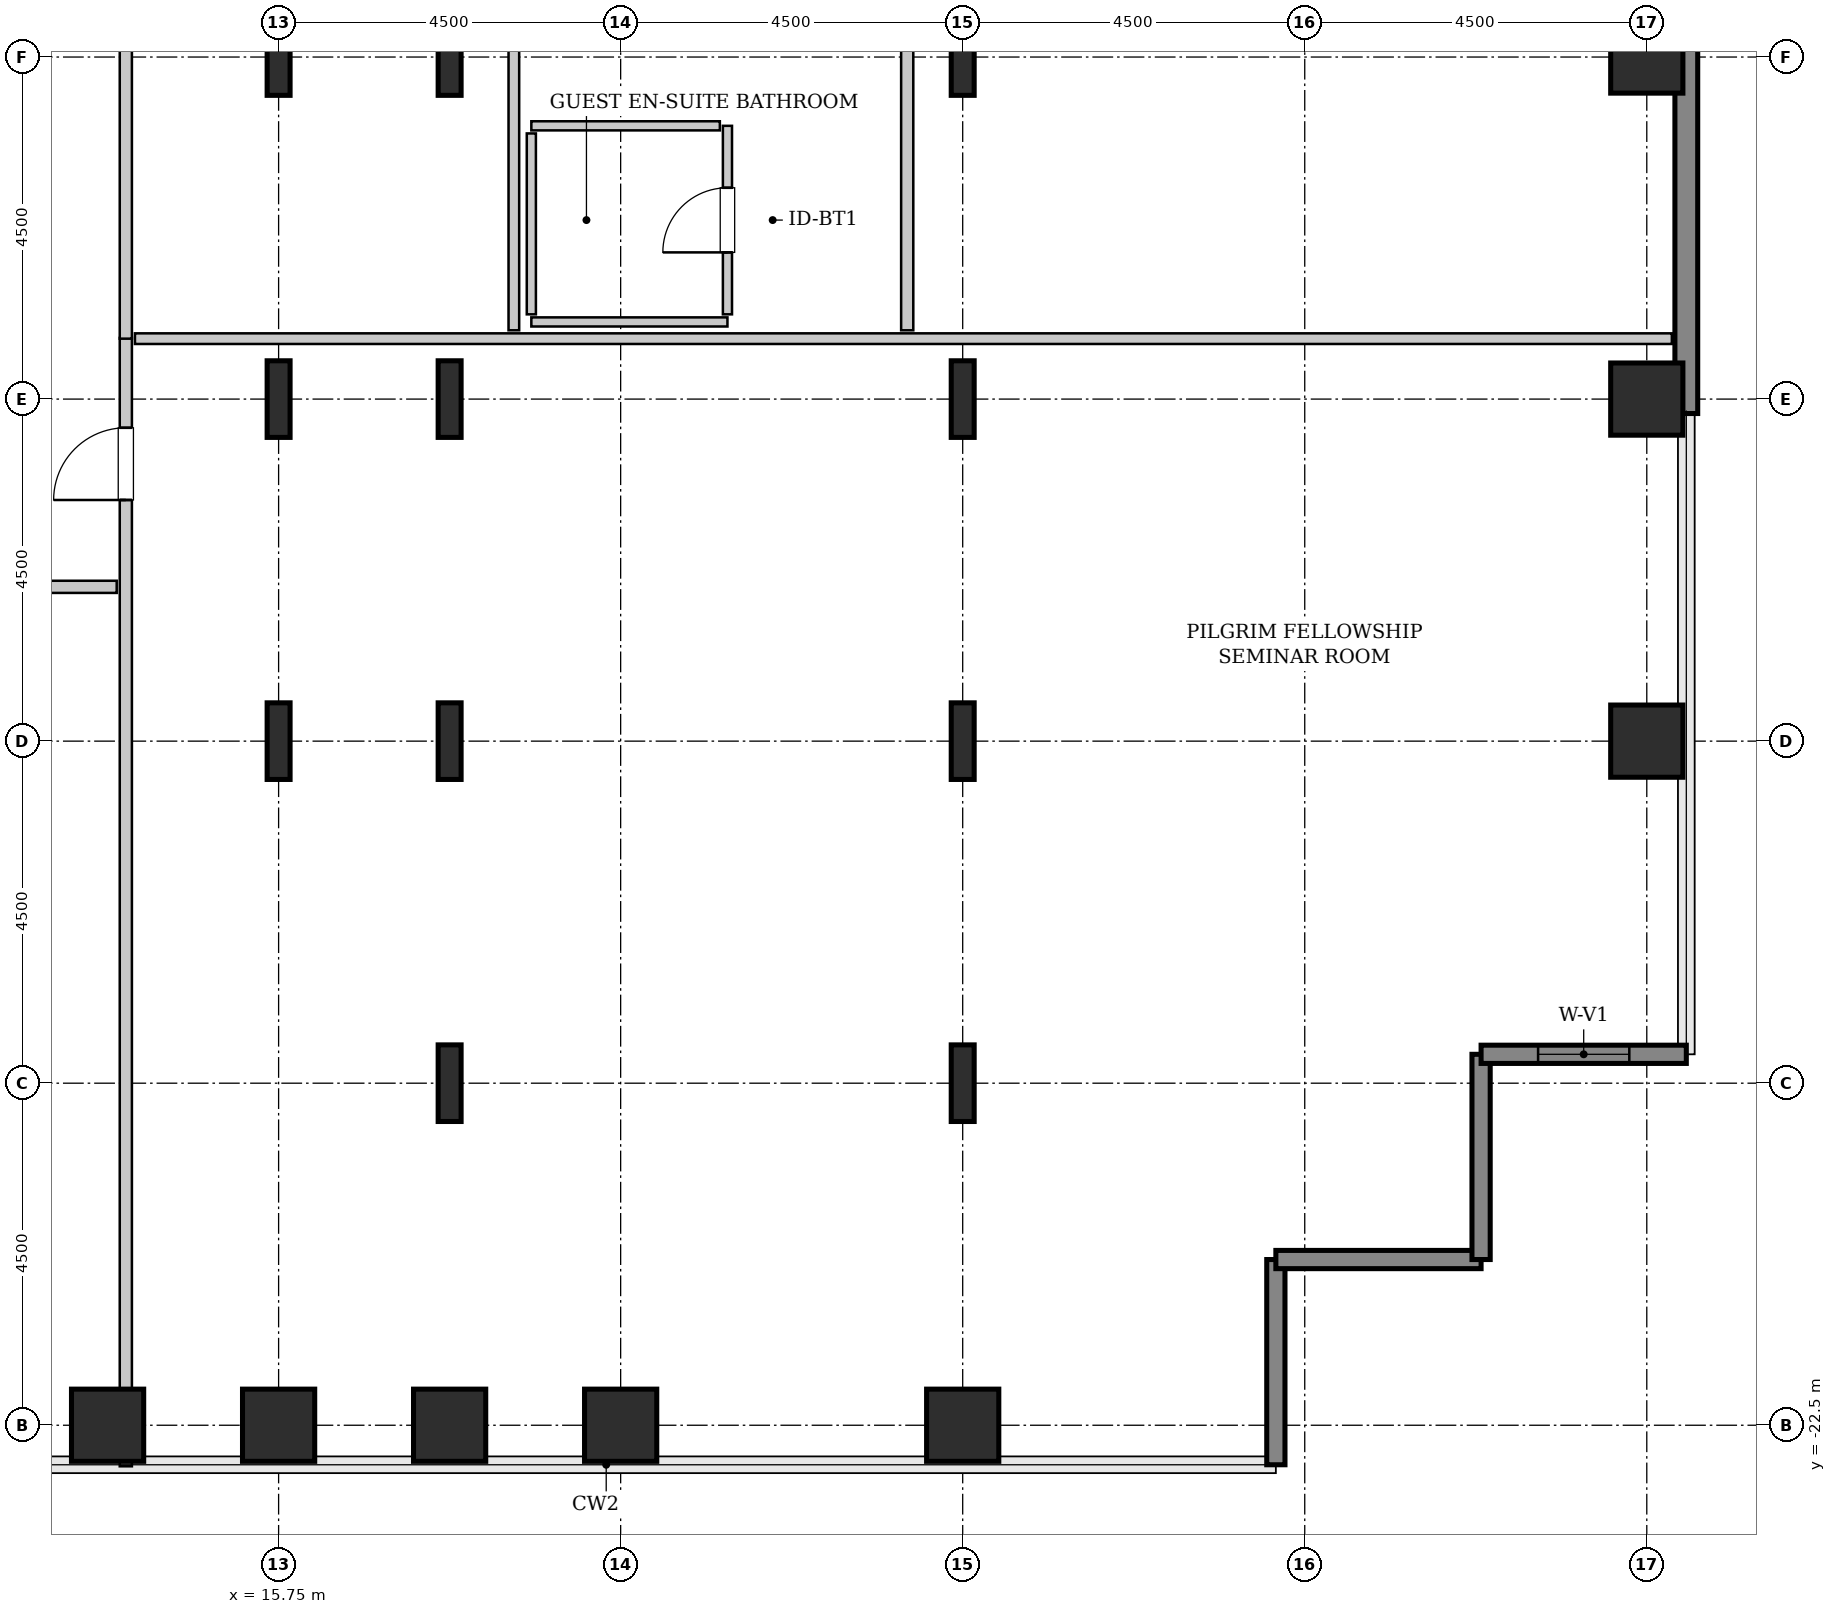
"""IFC4 building model, lengths in metres.
Left out: names, types, materials, properties, quantities, classifications, styles, units other than length and angle.
Written with IfcOpenShell. Run it as: python <this file> out.ifc"""

import sys

from ifc_helpers import new_model, si_unit, direction, frame, frame_2d, origin, origin_2d, place, context, subcontext, project, spatial, rectangle, hollow_rectangle, i_section, extrude, source, transform, mapped, element, fill, save


model = new_model("IFC4")
c1 = context("Model", 3, precision=1e-05, world=origin(), true_north=direction((0.0, 1.0)))
c2 = subcontext(c1, "Body", "Model", "MODEL_VIEW")
j1 = project(units=[si_unit("LENGTHUNIT", "METRE"), si_unit("PLANEANGLEUNIT", "RADIAN")], contexts=[c1])
p1 = place(None, origin())
s1 = spatial("IfcSite", under=j1, at=p1, CompositionType="ELEMENT")
p2 = place(p1, origin())
s2 = spatial("IfcBuilding", under=s1, at=p2, CompositionType="ELEMENT")
p3 = place(p2, frame((0.0, 0.0, 78.6)))
s3 = spatial("IfcBuildingStorey", under=s2, at=p3, CompositionType="ELEMENT", Elevation=78.6)
m1 = source(origin(), c2, "Body", "SweptSolid", [
    extrude(hollow_rectangle(XDim=0.95, YDim=0.95, WallThickness=0.045, InnerFilletRadius=0.045, OuterFilletRadius=0.09, at=origin_2d()), origin(), (0.0, 0.0, 1.0), 3.8),
])
for number, where, z_axis, x_axis in (
    (1, (13.5, -22.5, 0.0), (0.0, 0.0, 1.0), (1.0, 0.0, 0.0)),
    (2, (15.75, -22.5, 0.0), (0.0, 0.0, 1.0), (1.0, 0.0, 0.0)),
):
    element("IfcColumn", number, at=place(p3, frame(where, z_axis=z_axis, x_axis=x_axis)), inside=s3, PredefinedType="COLUMN", context=c2, shape_type="MappedRepresentation", body=[
        mapped(m1, transform((0.0, 0.0, 0.0), x_axis=(1.0, 0.0, 0.0), y_axis=(0.0, 1.0, 0.0), z_axis=(0.0, 0.0, 1.0), scale=1.0)),
    ])
m2 = source(origin(), c2, "Body", "SweptSolid", [
    extrude(i_section(OverallWidth=0.302, OverallDepth=1.008, WebThickness=0.021, FlangeThickness=0.04, FilletRadius=0.03, at=origin_2d()), origin(), (0.0, 0.0, 1.0), 3.8),
])
for number, where, z_axis, x_axis in (
    (3, (15.75, -13.5, 0.0), (0.0, 0.0, 1.0), (1.0, 0.0, 0.0)),
    (4, (15.75, -9.0, 0.0), (0.0, 0.0, 1.0), (1.0, 0.0, 0.0)),
    (5, (15.75, -4.5, 0.0), (0.0, 0.0, 1.0), (1.0, 0.0, 0.0)),
):
    element("IfcColumn", number, at=place(p3, frame(where, z_axis=z_axis, x_axis=x_axis)), inside=s3, PredefinedType="COLUMN", context=c2, shape_type="MappedRepresentation", body=[
        mapped(m2, transform((0.0, 0.0, 0.0), x_axis=(1.0, 0.0, 0.0), y_axis=(0.0, 1.0, 0.0), z_axis=(0.0, 0.0, 1.0), scale=1.0)),
    ])
p4 = place(p3, frame((18.0, -22.5, 0.0), z_axis=(0.0, 0.0, 1.0), x_axis=(1.0, 0.0, 0.0)))
e6 = element("IfcColumn", 6, at=p4, inside=s3, PredefinedType="COLUMN", context=c2, shape_type="MappedRepresentation", body=[
    mapped(m1, transform((0.0, 0.0, 0.0), x_axis=(1.0, 0.0, 0.0), y_axis=(0.0, 1.0, 0.0), z_axis=(0.0, 0.0, 1.0), scale=1.0)),
])
for number, where, z_axis, x_axis in (
    (7, (18.0, -18.0, 0.0), (0.0, 0.0, 1.0), (1.0, 0.0, 0.0)),
    (8, (18.0, -13.5, 0.0), (0.0, 0.0, 1.0), (1.0, 0.0, 0.0)),
    (9, (18.0, -9.0, 0.0), (0.0, 0.0, 1.0), (1.0, 0.0, 0.0)),
    (10, (18.0, -4.5, 0.0), (0.0, 0.0, 1.0), (1.0, 0.0, 0.0)),
):
    element("IfcColumn", number, at=place(p3, frame(where, z_axis=z_axis, x_axis=x_axis)), inside=s3, PredefinedType="COLUMN", context=c2, shape_type="MappedRepresentation", body=[
        mapped(m2, transform((0.0, 0.0, 0.0), x_axis=(1.0, 0.0, 0.0), y_axis=(0.0, 1.0, 0.0), z_axis=(0.0, 0.0, 1.0), scale=1.0)),
    ])
for number, where, z_axis, x_axis in (
    (11, (20.25, -22.5, 0.0), (0.0, 0.0, 1.0), (1.0, 0.0, 0.0)),
    (12, (24.75, -22.5, 0.0), (0.0, 0.0, 1.0), (1.0, 0.0, 0.0)),
):
    element("IfcColumn", number, at=place(p3, frame(where, z_axis=z_axis, x_axis=x_axis)), inside=s3, PredefinedType="COLUMN", context=c2, shape_type="MappedRepresentation", body=[
        mapped(m1, transform((0.0, 0.0, 0.0), x_axis=(1.0, 0.0, 0.0), y_axis=(0.0, 1.0, 0.0), z_axis=(0.0, 0.0, 1.0), scale=1.0)),
    ])
for number, where, z_axis, x_axis in (
    (13, (24.75, -18.0, 0.0), (0.0, 0.0, 1.0), (1.0, 0.0, 0.0)),
    (14, (24.75, -13.5, 0.0), (0.0, 0.0, 1.0), (1.0, 0.0, 0.0)),
    (15, (24.75, -9.0, 0.0), (0.0, 0.0, 1.0), (1.0, 0.0, 0.0)),
    (16, (24.75, -4.5, 0.0), (0.0, 0.0, 1.0), (1.0, 0.0, 0.0)),
):
    element("IfcColumn", number, at=place(p3, frame(where, z_axis=z_axis, x_axis=x_axis)), inside=s3, PredefinedType="COLUMN", context=c2, shape_type="MappedRepresentation", body=[
        mapped(m2, transform((0.0, 0.0, 0.0), x_axis=(1.0, 0.0, 0.0), y_axis=(0.0, 1.0, 0.0), z_axis=(0.0, 0.0, 1.0), scale=1.0)),
    ])
for number, where, z_axis, x_axis in (
    (17, (33.75, -13.5, 0.0), (0.0, 0.0, 1.0), (1.0, 0.0, 0.0)),
    (18, (33.75, -9.0, 0.0), (0.0, 0.0, 1.0), (1.0, 0.0, 0.0)),
    (19, (33.75, -4.5, 0.0), (0.0, 0.0, 1.0), (1.0, 0.0, 0.0)),
):
    element("IfcColumn", number, at=place(p3, frame(where, z_axis=z_axis, x_axis=x_axis)), inside=s3, PredefinedType="COLUMN", context=c2, shape_type="MappedRepresentation", body=[
        mapped(m1, transform((0.0, 0.0, 0.0), x_axis=(1.0, 0.0, 0.0), y_axis=(0.0, 1.0, 0.0), z_axis=(0.0, 0.0, 1.0), scale=1.0)),
    ])
m3 = source(origin(), c2, "Body", "SweptSolid", [
    extrude(rectangle(XDim=4.88, YDim=0.3, at=frame_2d((2.44, 0.0))), origin(), (0.0, 0.0, 1.0), 3.55),
])
p5 = place(p3, frame((34.27, -9.19, 0.0), z_axis=(0.0, 0.0, 1.0), x_axis=(0.0, 1.0, 0.0)))
e20 = element("IfcWall", 20, at=p5, inside=s3, PredefinedType="SHEAR", context=c2, shape_type="MappedRepresentation", body=[
    mapped(m3, transform((0.0, 0.0, 0.0), x_axis=(1.0, 0.0, 0.0), y_axis=(0.0, 1.0, 0.0), z_axis=(0.0, 0.0, 1.0), scale=1.0)),
])
m4 = source(origin(), c2, "Body", "SweptSolid", [
    extrude(rectangle(XDim=2.7, YDim=0.24, at=frame_2d((1.35, 0.0))), origin(), (0.0, 0.0, 1.0), 3.55),
])
for number, where, z_axis, x_axis in (
    (21, (28.87, -23.02, 0.0), (0.0, 0.0, 1.0), (0.0, 1.0, 0.0)),
    (22, (28.87, -20.32, 0.0), (0.0, 0.0, 1.0), (1.0, 0.0, 0.0)),
    (23, (31.57, -20.32, 0.0), (0.0, 0.0, 1.0), (0.0, 1.0, 0.0)),
):
    element("IfcWall", number, at=place(p3, frame(where, z_axis=z_axis, x_axis=x_axis)), inside=s3, PredefinedType="SHEAR", context=c2, shape_type="MappedRepresentation", body=[
        mapped(m4, transform((0.0, 0.0, 0.0), x_axis=(1.0, 0.0, 0.0), y_axis=(0.0, 1.0, 0.0), z_axis=(0.0, 0.0, 1.0), scale=1.0)),
    ])
p6 = place(p3, frame((31.57, -17.62, 0.0), z_axis=(0.0, 0.0, 1.0), x_axis=(1.0, 0.0, 0.0)))
e24 = element("IfcWall", 24, at=p6, inside=s3, PredefinedType="SHEAR", context=c2, shape_type="MappedRepresentation", body=[
    mapped(m4, transform((0.0, 0.0, 0.0), x_axis=(1.0, 0.0, 0.0), y_axis=(0.0, 1.0, 0.0), z_axis=(0.0, 0.0, 1.0), scale=1.0)),
])
p7 = place(p6, frame((0.75, 0.0, 0.85)))
e25 = element("IfcOpeningElement", 25, at=p7, cuts=e24, PredefinedType="OPENING", context=c2, shape_type="SweptSolid", body=[
    extrude(rectangle(XDim=1.2, YDim=1.8, at=frame_2d((0.6, 0.9))), frame((0.0, 0.13, 0.0), z_axis=(0.0, -1.0, 0.0), x_axis=(1.0, 0.0, 0.0)), (0.0, 0.0, 1.0), 0.26),
])
m5 = source(origin(), c2, "Body", "SweptSolid", [
    extrude(rectangle(XDim=2.58, YDim=0.12, at=frame_2d((1.29, 0.0))), origin(), (0.0, 0.0, 1.0), 3.535),
])
p8 = place(p3, frame((19.075, -7.985, 0.0), z_axis=(0.0, 0.0, 1.0), x_axis=(1.0, 0.0, 0.0)))
e26 = element("IfcWall", 26, at=p8, inside=s3, PredefinedType="PLUMBINGWALL", context=c2, shape_type="MappedRepresentation", body=[
    mapped(m5, transform((0.0, 0.0, 0.0), x_axis=(1.0, 0.0, 0.0), y_axis=(0.0, 1.0, 0.0), z_axis=(0.0, 0.0, 1.0), scale=1.0)),
])
m6 = source(origin(), c2, "Body", "SweptSolid", [
    extrude(rectangle(XDim=2.48, YDim=0.12, at=frame_2d((1.24, 0.0))), origin(), (0.0, 0.0, 1.0), 3.535),
])
p9 = place(p3, frame((21.655, -7.885, 0.0), z_axis=(0.0, 0.0, 1.0), x_axis=(0.0, 1.0, 0.0)))
e27 = element("IfcWall", 27, at=p9, inside=s3, PredefinedType="PLUMBINGWALL", context=c2, shape_type="MappedRepresentation", body=[
    mapped(m6, transform((0.0, 0.0, 0.0), x_axis=(1.0, 0.0, 0.0), y_axis=(0.0, 1.0, 0.0), z_axis=(0.0, 0.0, 1.0), scale=1.0)),
])
p10 = place(p9, frame((0.815, 0.0, 0.0)))
e28 = element("IfcOpeningElement", 28, at=p10, cuts=e27, PredefinedType="OPENING", context=c2, shape_type="SweptSolid", body=[
    extrude(rectangle(XDim=0.85, YDim=2.1, at=frame_2d((0.425, 1.05))), frame((0.0, 0.07, 0.0), z_axis=(0.0, -1.0, 0.0), x_axis=(1.0, 0.0, 0.0)), (0.0, 0.0, 1.0), 0.14),
])
p11 = place(p3, frame((19.075, -5.405, 0.0), z_axis=(0.0, 0.0, 1.0), x_axis=(1.0, 0.0, 0.0)))
e29 = element("IfcWall", 29, at=p11, inside=s3, PredefinedType="PLUMBINGWALL", context=c2, shape_type="MappedRepresentation", body=[
    mapped(m6, transform((0.0, 0.0, 0.0), x_axis=(1.0, 0.0, 0.0), y_axis=(0.0, 1.0, 0.0), z_axis=(0.0, 0.0, 1.0), scale=1.0)),
])
m7 = source(origin(), c2, "Body", "SweptSolid", [
    extrude(rectangle(XDim=2.38, YDim=0.12, at=frame_2d((1.19, 0.0))), origin(), (0.0, 0.0, 1.0), 3.535),
])
p12 = place(p3, frame((19.075, -7.885, 0.0), z_axis=(0.0, 0.0, 1.0), x_axis=(0.0, 1.0, 0.0)))
e30 = element("IfcWall", 30, at=p12, inside=s3, PredefinedType="PLUMBINGWALL", context=c2, shape_type="MappedRepresentation", body=[
    mapped(m7, transform((0.0, 0.0, 0.0), x_axis=(1.0, 0.0, 0.0), y_axis=(0.0, 1.0, 0.0), z_axis=(0.0, 0.0, 1.0), scale=1.0)),
])
m8 = source(origin(), c2, "Body", "SweptSolid", [
    extrude(rectangle(XDim=14.845, YDim=0.16, at=frame_2d((7.422, 0.0))), origin(), (0.0, 0.0, 1.0), 3.535),
])
p13 = place(p3, frame((13.74, -23.04, 0.0), z_axis=(0.0, 0.0, 1.0), x_axis=(0.0, 1.0, 0.0)))
e31 = element("IfcWall", 31, at=p13, inside=s3, PredefinedType="PARTITIONING", context=c2, shape_type="MappedRepresentation", body=[
    mapped(m8, transform((0.0, 0.0, 0.0), x_axis=(1.0, 0.0, 0.0), y_axis=(0.0, 1.0, 0.0), z_axis=(0.0, 0.0, 1.0), scale=1.0)),
])
p14 = place(p13, frame((12.712, 0.0, 0.0)))
e32 = element("IfcOpeningElement", 32, at=p14, cuts=e31, PredefinedType="OPENING", context=c2, shape_type="SweptSolid", body=[
    extrude(rectangle(XDim=0.95, YDim=2.1, at=frame_2d((0.475, 1.05))), frame((0.0, 0.09, 0.0), z_axis=(0.0, -1.0, 0.0), x_axis=(1.0, 0.0, 0.0)), (0.0, 0.0, 1.0), 0.18),
])
m9 = source(origin(), c2, "Body", "SweptSolid", [
    extrude(rectangle(XDim=20.22, YDim=0.14, at=frame_2d((10.11, 0.0))), origin(), (0.0, 0.0, 1.0), 3.535),
])
p15 = place(p3, frame((13.86, -8.205, 0.0), z_axis=(0.0, 0.0, 1.0), x_axis=(1.0, 0.0, 0.0)))
e33 = element("IfcWall", 33, at=p15, inside=s3, PredefinedType="PARTITIONING", context=c2, shape_type="MappedRepresentation", body=[
    mapped(m9, transform((0.0, 0.0, 0.0), x_axis=(1.0, 0.0, 0.0), y_axis=(0.0, 1.0, 0.0), z_axis=(0.0, 0.0, 1.0), scale=1.0)),
])
m10 = source(origin(), c2, "Body", "SweptSolid", [
    extrude(rectangle(XDim=15.7, YDim=0.16, at=frame_2d((7.85, 0.0))), origin(), (0.0, 0.0, 1.0), 3.535),
])
p16 = place(p3, frame((24.02, -8.095, 0.0), z_axis=(0.0, 0.0, 1.0), x_axis=(0.0, 1.0, 0.0)))
e34 = element("IfcWall", 34, at=p16, inside=s3, PredefinedType="PARTITIONING", context=c2, shape_type="MappedRepresentation", body=[
    mapped(m10, transform((0.0, 0.0, 0.0), x_axis=(1.0, 0.0, 0.0), y_axis=(0.0, 1.0, 0.0), z_axis=(0.0, 0.0, 1.0), scale=1.0)),
])
p17 = place(p16, frame((9.87, 0.0, 0.0)))
e35 = element("IfcOpeningElement", 35, at=p17, cuts=e34, PredefinedType="OPENING", context=c2, shape_type="SweptSolid", body=[
    extrude(rectangle(XDim=0.95, YDim=2.1, at=frame_2d((0.475, 1.05))), frame((0.0, 0.09, 0.0), z_axis=(0.0, -1.0, 0.0), x_axis=(1.0, 0.0, 0.0)), (0.0, 0.0, 1.0), 0.18),
])
m11 = source(origin(), c2, "Body", "SweptSolid", [
    extrude(rectangle(XDim=9.595, YDim=0.16, at=frame_2d((4.797, 0.0))), origin(), (0.0, 0.0, 1.0), 3.535),
])
p18 = place(p3, frame((13.74, -8.205, 0.0), z_axis=(0.0, 0.0, 1.0), x_axis=(0.0, 1.0, 0.0)))
e36 = element("IfcWall", 36, at=p18, inside=s3, PredefinedType="PARTITIONING", context=c2, shape_type="MappedRepresentation", body=[
    mapped(m11, transform((0.0, 0.0, 0.0), x_axis=(1.0, 0.0, 0.0), y_axis=(0.0, 1.0, 0.0), z_axis=(0.0, 0.0, 1.0), scale=1.0)),
])
p19 = place(p18, frame((4.323, 0.0, 0.0)))
e37 = element("IfcOpeningElement", 37, at=p19, cuts=e36, PredefinedType="OPENING", context=c2, shape_type="SweptSolid", body=[
    extrude(rectangle(XDim=0.95, YDim=2.1, at=frame_2d((0.475, 1.05))), frame((0.0, 0.09, 0.0), z_axis=(0.0, -1.0, 0.0), x_axis=(1.0, 0.0, 0.0)), (0.0, 0.0, 1.0), 0.18),
])
m12 = source(origin(), c2, "Body", "SweptSolid", [
    extrude(rectangle(XDim=9.365, YDim=0.14, at=frame_2d((4.683, 0.0))), origin(), (0.0, 0.0, 1.0), 3.535),
])
p20 = place(p3, frame((18.845, -8.095, 0.0), z_axis=(0.0, 0.0, 1.0), x_axis=(0.0, 1.0, 0.0)))
e38 = element("IfcWall", 38, at=p20, inside=s3, PredefinedType="PARTITIONING", context=c2, shape_type="MappedRepresentation", body=[
    mapped(m12, transform((0.0, 0.0, 0.0), x_axis=(1.0, 0.0, 0.0), y_axis=(0.0, 1.0, 0.0), z_axis=(0.0, 0.0, 1.0), scale=1.0)),
])
m13 = source(origin(), c2, "Body", "SweptSolid", [
    extrude(rectangle(XDim=4.46, YDim=0.16, at=frame_2d((2.23, 0.0))), origin(), (0.0, 0.0, 1.0), 3.535),
])
p21 = place(p3, frame((9.16, -11.47, 0.0), z_axis=(0.0, 0.0, 1.0), x_axis=(1.0, 0.0, 0.0)))
e39 = element("IfcWall", 39, at=p21, inside=s3, PredefinedType="PARTITIONING", context=c2, shape_type="MappedRepresentation", body=[
    mapped(m13, transform((0.0, 0.0, 0.0), x_axis=(1.0, 0.0, 0.0), y_axis=(0.0, 1.0, 0.0), z_axis=(0.0, 0.0, 1.0), scale=1.0)),
])
p22 = place(p21, frame((1.755, 0.0, 0.0)))
e40 = element("IfcOpeningElement", 40, at=p22, cuts=e39, PredefinedType="OPENING", context=c2, shape_type="SweptSolid", body=[
    extrude(rectangle(XDim=0.95, YDim=2.1, at=frame_2d((0.475, 1.05))), frame((0.0, 0.09, 0.0), z_axis=(0.0, -1.0, 0.0), x_axis=(1.0, 0.0, 0.0)), (0.0, 0.0, 1.0), 0.18),
])
m14 = source(origin(), c2, "Body", "SweptSolid", [
    extrude(rectangle(XDim=1.2, YDim=1.8, at=frame_2d((0.6, 0.9))), frame((0.0, 0.03, 0.0), z_axis=(0.0, -1.0, 0.0), x_axis=(1.0, 0.0, 0.0)), (0.0, 0.0, 1.0), 0.06),
])
p23 = place(p7, origin())
e41 = element("IfcWindow", 41, at=p23, inside=s3, PartitioningType="SINGLE_PANEL", PredefinedType="WINDOW", context=c2, shape_type="MappedRepresentation", body=[
    mapped(m14, transform((0.0, 0.0, 0.0), x_axis=(1.0, 0.0, 0.0), y_axis=(0.0, 1.0, 0.0), z_axis=(0.0, 0.0, 1.0), scale=1.0)),
])
fill(e25, e41)
m15 = source(origin(), c2, "Body", "SweptSolid", [
    extrude(rectangle(XDim=0.85, YDim=2.1, at=frame_2d((0.425, 1.05))), frame((0.0, 0.025, 0.0), z_axis=(0.0, -1.0, 0.0), x_axis=(1.0, 0.0, 0.0)), (0.0, 0.0, 1.0), 0.05),
])
p24 = place(p10, origin())
e42 = element("IfcDoor", 42, at=p24, inside=s3, OperationType="SINGLE_SWING_LEFT", PredefinedType="DOOR", context=c2, shape_type="MappedRepresentation", body=[
    mapped(m15, transform((0.0, 0.0, 0.0), x_axis=(1.0, 0.0, 0.0), y_axis=(0.0, 1.0, 0.0), z_axis=(0.0, 0.0, 1.0), scale=1.0)),
])
fill(e28, e42)
m16 = source(origin(), c2, "Body", "SweptSolid", [
    extrude(rectangle(XDim=0.95, YDim=2.1, at=frame_2d((0.475, 1.05))), frame((0.0, 0.025, 0.0), z_axis=(0.0, -1.0, 0.0), x_axis=(1.0, 0.0, 0.0)), (0.0, 0.0, 1.0), 0.05),
])
p25 = place(p14, origin())
e43 = element("IfcDoor", 43, at=p25, inside=s3, OperationType="SINGLE_SWING_LEFT", PredefinedType="DOOR", context=c2, shape_type="MappedRepresentation", body=[
    mapped(m16, transform((0.0, 0.0, 0.0), x_axis=(1.0, 0.0, 0.0), y_axis=(0.0, 1.0, 0.0), z_axis=(0.0, 0.0, 1.0), scale=1.0)),
])
fill(e32, e43)
save(model, sys.argv[1])
